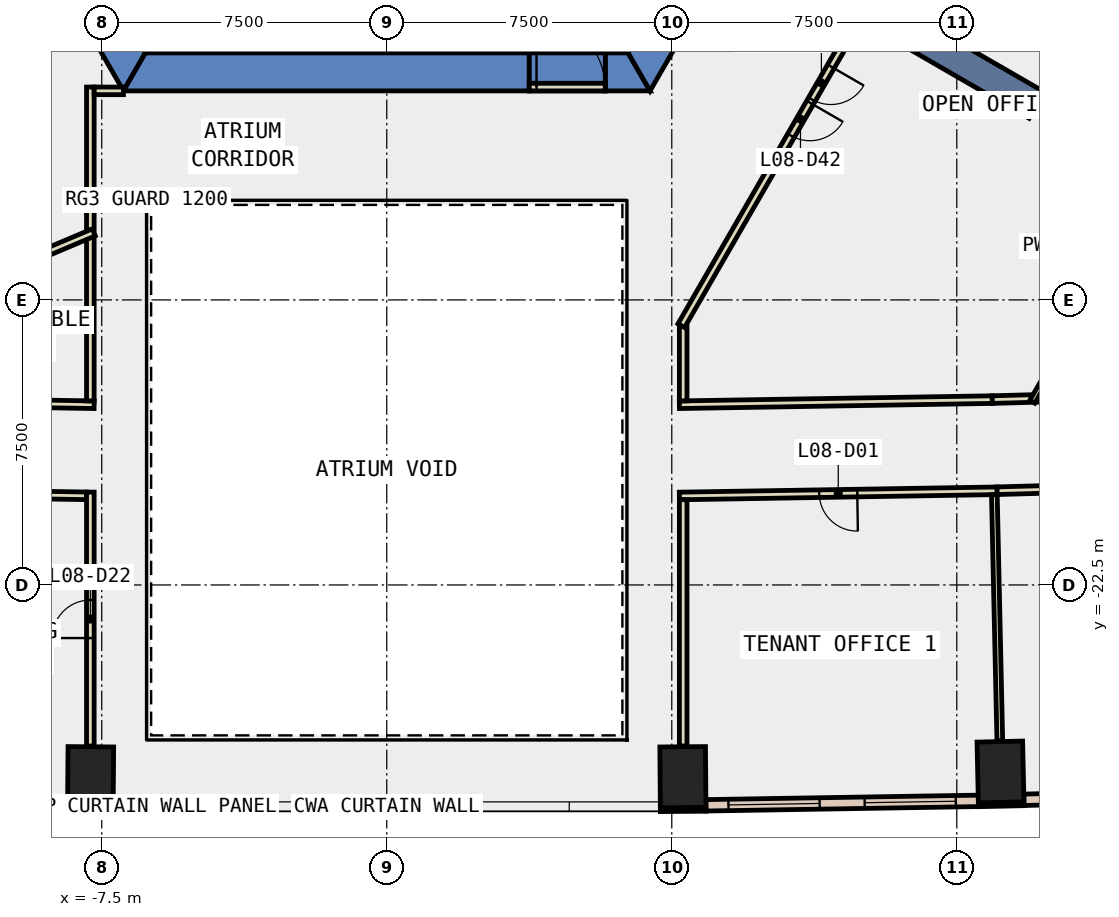
"""IFC4 building model, lengths in metres.
Left out: names, types, materials, properties, quantities, classifications, styles, units other than length and angle.
Written with IfcOpenShell. Run it as: python <this file> out.ifc"""

import sys

from ifc_helpers import new_model, si_unit, direction, frame, frame_2d, origin, origin_2d, place, context, subcontext, project, spatial, polyline, rectangle, outline, extrude, element, fill, save


model = new_model("IFC4")
c1 = context("Model", 3, precision=1e-05, world=origin(), true_north=direction((0.0, 1.0)))
c2 = subcontext(c1, "Body", "Model", "MODEL_VIEW")
j1 = project(units=[si_unit("LENGTHUNIT", "METRE"), si_unit("PLANEANGLEUNIT", "RADIAN")], contexts=[c1])
p1 = place(None, origin())
s1 = spatial("IfcSite", under=j1, at=p1, CompositionType="ELEMENT")
p2 = place(p1, origin())
s2 = spatial("IfcBuilding", under=s1, at=p2, CompositionType="ELEMENT")
p3 = place(p2, frame((0.0, 0.0, 43.4)))
s3 = spatial("IfcBuildingStorey", under=s2, at=p3, CompositionType="ELEMENT", Elevation=43.4)
for number, where, z_axis, x_axis in (
    (1, (-7.793, -27.558, -0.4), (0.0, 0.0, 1.0), (-1.0, 0.008, 0.0)),
    (2, (7.793, -27.558, -0.4), (0.0, 0.0, 1.0), (1.0, 0.008, 0.0)),
    (3, (16.15, -27.421, -0.4), (0.0, 0.0, 1.0), (1.0, 0.022, 0.0)),
):
    element("IfcColumn", number, at=place(p3, frame(where, z_axis=z_axis, x_axis=x_axis)), inside=s3, PredefinedType="COLUMN", context=c2, shape_type="SweptSolid", body=[
        extrude(rectangle(XDim=1.2, YDim=1.6, at=origin_2d()), origin(), (0.0, 0.0, 1.0), 4.2),
    ])
p4 = place(p3, frame((0.0, 0.0, -0.4)))
e4 = element("IfcWall", 4, at=p4, inside=s3, PredefinedType="SHEAR", context=c2, shape_type="SweptSolid", body=[
    extrude(outline(polyline([(-13.856, 2.5), (-6.928, -9.5), (-6.351, -8.5), (-12.702, 2.5), (-13.856, 2.5)])), origin(), (0.0, 0.0, 1.0), 4.2),
])
p5 = place(p3, frame((0.0, 0.0, -0.4)))
e5 = element("IfcWall", 5, at=p5, inside=s3, PredefinedType="SHEAR", context=c2, shape_type="SweptSolid", body=[
    extrude(outline(polyline([(3.75, -9.5), (3.75, -8.5), (-6.351, -8.5), (-6.928, -9.5), (3.75, -9.5)])), origin(), (0.0, 0.0, 1.0), 4.2),
])
p6 = place(p3, frame((0.0, 0.0, -0.4)))
e6 = element("IfcWall", 6, at=p6, inside=s3, PredefinedType="SHEAR", context=c2, shape_type="SweptSolid", body=[
    extrude(outline(polyline([(5.75, -8.5), (5.75, -9.5), (6.928, -9.5), (6.351, -8.5), (5.75, -8.5)])), origin(), (0.0, 0.0, 1.0), 4.2),
])
p7 = place(p3, frame((0.0, 0.0, 3.6)))
e7 = element("IfcWall", 7, at=p7, inside=s3, PredefinedType="SHEAR", context=c2, shape_type="SweptSolid", body=[
    extrude(outline(polyline([(5.75, -9.5), (5.75, -8.5), (3.75, -8.5), (3.75, -9.5), (5.75, -9.5)])), origin(), (0.0, 0.0, 1.0), 0.2),
])
p8 = place(p3, frame((0.0, 0.0, -0.4)))
e8 = element("IfcWall", 8, at=p8, inside=s3, PredefinedType="SHEAR", context=c2, shape_type="SweptSolid", body=[
    extrude(outline(polyline([(8.117, -7.44), (7.252, -6.94), (6.351, -8.5), (6.928, -9.5), (8.117, -7.44)])), origin(), (0.0, 0.0, 1.0), 4.2),
])
p9 = place(p3, frame((9.31, -5.375, -0.4), z_axis=(0.0, 0.0, 1.0), x_axis=(0.866017533419, -0.500013631625, 0.0)))
e9 = element("IfcWall", 9, at=p9, inside=s3, PredefinedType="SHEAR", context=c2, shape_type="SweptSolid", body=[
    extrude(rectangle(XDim=9.0, YDim=0.8, at=frame_2d((4.5, 0.0))), origin(), (0.0, 0.0, 1.0), 4.2),
])
for number, where, z_axis, x_axis in (
    (10, (-8.4, -28.403, 0.0), (0.0, 0.0, 1.0), (1.0, -0.008, 0.0)),
    (11, (7.2, -28.413, 0.0), (0.0, 0.0, 1.0), (1.0, 0.008, 0.0)),
):
    element("IfcWall", number, at=place(p3, frame(where, z_axis=z_axis, x_axis=x_axis)), inside=s3, PredefinedType="STANDARD", context=c2, shape_type="SweptSolid", body=[
        extrude(rectangle(XDim=1.2, YDim=0.1, at=frame_2d((0.6, 0.0))), origin(), (0.0, 0.0, 1.0), 3.8),
    ])
p10 = place(p3, frame((15.569, -28.284, 0.0), z_axis=(0.0, 0.0, 1.0), x_axis=(0.99976752127, 0.021561618973, 0.0)))
e12 = element("IfcWall", 12, at=p10, inside=s3, PredefinedType="STANDARD", context=c2, shape_type="SweptSolid", body=[
    extrude(rectangle(XDim=1.2, YDim=0.1, at=frame_2d((0.6, 0.0))), origin(), (0.0, 0.0, 1.0), 3.8),
])
p11 = place(p3, frame((-15.568, -28.181, 0.0), z_axis=(0.0, 0.0, 1.0), x_axis=(0.999866467443, -0.016341581408, 0.0)))
e13 = element("IfcWall", 13, at=p11, inside=s3, PredefinedType="STANDARD", context=c2, shape_type="SweptSolid", body=[
    extrude(rectangle(XDim=7.171, YDim=0.3, at=frame_2d((3.585, 0.0))), origin(), (0.0, 0.0, 1.0), 3.8),
])
p12 = place(p11, frame((0.593, 0.0, 0.9)))
e14 = element("IfcOpeningElement", 14, at=p12, cuts=e13, PredefinedType="OPENING", context=c2, shape_type="SweptSolid", body=[
    extrude(rectangle(XDim=2.4, YDim=2.6, at=frame_2d((1.2, 1.3))), frame((0.0, 0.16, 0.0), z_axis=(0.0, -1.0, 0.0), x_axis=(1.0, 0.0, 0.0)), (0.0, 0.0, 1.0), 0.32),
])
p13 = place(p11, frame((4.178, 0.0, 0.9)))
e15 = element("IfcOpeningElement", 15, at=p13, cuts=e13, PredefinedType="OPENING", context=c2, shape_type="SweptSolid", body=[
    extrude(rectangle(XDim=2.4, YDim=2.6, at=frame_2d((1.2, 1.3))), frame((0.0, 0.16, 0.0), z_axis=(0.0, -1.0, 0.0), x_axis=(1.0, 0.0, 0.0)), (0.0, 0.0, 1.0), 0.32),
])
p14 = place(p3, frame((8.398, -28.298, 0.0), z_axis=(0.0, 0.0, 1.0), x_axis=(0.999866467443, 0.016341581408, 0.0)))
e16 = element("IfcWall", 16, at=p14, inside=s3, PredefinedType="STANDARD", context=c2, shape_type="SweptSolid", body=[
    extrude(rectangle(XDim=7.171, YDim=0.3, at=frame_2d((3.585, 0.0))), origin(), (0.0, 0.0, 1.0), 3.8),
])
p15 = place(p14, frame((0.593, 0.0, 0.9)))
e17 = element("IfcOpeningElement", 17, at=p15, cuts=e16, PredefinedType="OPENING", context=c2, shape_type="SweptSolid", body=[
    extrude(rectangle(XDim=2.4, YDim=2.6, at=frame_2d((1.2, 1.3))), frame((0.0, 0.16, 0.0), z_axis=(0.0, -1.0, 0.0), x_axis=(1.0, 0.0, 0.0)), (0.0, 0.0, 1.0), 0.32),
])
p16 = place(p14, frame((4.178, 0.0, 0.9)))
e18 = element("IfcOpeningElement", 18, at=p16, cuts=e16, PredefinedType="OPENING", context=c2, shape_type="SweptSolid", body=[
    extrude(rectangle(XDim=2.4, YDim=2.6, at=frame_2d((1.2, 1.3))), frame((0.0, 0.16, 0.0), z_axis=(0.0, -1.0, 0.0), x_axis=(1.0, 0.0, 0.0)), (0.0, 0.0, 1.0), 0.32),
])
p17 = place(p3, frame((16.765, -28.154, 0.0), z_axis=(0.0, 0.0, 1.0), x_axis=(0.999611502654, 0.02787191709, 0.0)))
e19 = element("IfcWall", 19, at=p17, inside=s3, PredefinedType="STANDARD", context=c2, shape_type="SweptSolid", body=[
    extrude(rectangle(XDim=7.174, YDim=0.3, at=frame_2d((3.587, 0.0))), origin(), (0.0, 0.0, 1.0), 3.8),
])
p18 = place(p17, frame((0.593, 0.0, 0.9)))
e20 = element("IfcOpeningElement", 20, at=p18, cuts=e19, PredefinedType="OPENING", context=c2, shape_type="SweptSolid", body=[
    extrude(rectangle(XDim=2.4, YDim=2.6, at=frame_2d((1.2, 1.3))), frame((0.0, 0.16, 0.0), z_axis=(0.0, -1.0, 0.0), x_axis=(1.0, 0.0, 0.0)), (0.0, 0.0, 1.0), 0.32),
])
p19 = place(p17, frame((4.18, 0.0, 0.9)))
e21 = element("IfcOpeningElement", 21, at=p19, cuts=e19, PredefinedType="OPENING", context=c2, shape_type="SweptSolid", body=[
    extrude(rectangle(XDim=2.4, YDim=2.6, at=frame_2d((1.2, 1.3))), frame((0.0, 0.16, 0.0), z_axis=(0.0, -1.0, 0.0), x_axis=(1.0, 0.0, 0.0)), (0.0, 0.0, 1.0), 0.32),
])
p20 = place(p3, frame((7.7, -17.758, 0.0), z_axis=(0.0, 0.0, 1.0), x_axis=(0.999865574926, 0.016396099485, 0.0)))
e22 = element("IfcWall", 22, at=p20, inside=s3, PredefinedType="PARTITIONING", context=c2, shape_type="SweptSolid", body=[
    extrude(rectangle(XDim=8.234, YDim=0.2, at=frame_2d((4.117, 0.0))), origin(), (0.0, 0.0, 1.0), 3.8),
])
p21 = place(p3, frame((15.933, -17.623, 0.0), z_axis=(0.0, 0.0, 1.0), x_axis=(0.999627129061, 0.027305729179, 0.0)))
e23 = element("IfcWall", 23, at=p21, inside=s3, PredefinedType="PARTITIONING", context=c2, shape_type="SweptSolid", body=[
    extrude(rectangle(XDim=1.028, YDim=0.2, at=frame_2d((0.514, 0.0))), origin(), (0.0, 0.0, 1.0), 3.8),
])
p22 = place(p3, frame((17.111, -17.591, 0.0), z_axis=(0.0, 0.0, 1.0), x_axis=(0.99960470841, 0.028114532261, 0.0)))
e24 = element("IfcWall", 24, at=p22, inside=s3, PredefinedType="PARTITIONING", context=c2, shape_type="SweptSolid", body=[
    extrude(rectangle(XDim=5.87, YDim=0.2, at=frame_2d((2.935, 0.0))), origin(), (0.0, 0.0, 1.0), 3.8),
])
p23 = place(p22, frame((2.435, 0.0, 0.0)))
e25 = element("IfcOpeningElement", 25, at=p23, cuts=e24, PredefinedType="OPENING", context=c2, shape_type="SweptSolid", body=[
    extrude(rectangle(XDim=1.0, YDim=2.1, at=frame_2d((0.5, 1.05))), frame((0.0, 0.11, 0.0), z_axis=(0.0, -1.0, 0.0), x_axis=(1.0, 0.0, 0.0)), (0.0, 0.0, 1.0), 0.22),
])
p24 = place(p3, frame((-15.73, -17.627, 0.0), z_axis=(0.0, 0.0, 1.0), x_axis=(0.999866746812, -0.016324479129, 0.0)))
e26 = element("IfcWall", 26, at=p24, inside=s3, PredefinedType="PARTITIONING", context=c2, shape_type="SweptSolid", body=[
    extrude(rectangle(XDim=8.031, YDim=0.2, at=frame_2d((4.016, 0.0))), origin(), (0.0, 0.0, 1.0), 3.8),
])
p25 = place(p24, frame((3.515, 0.0, 0.0)))
e27 = element("IfcOpeningElement", 27, at=p25, cuts=e26, PredefinedType="OPENING", context=c2, shape_type="SweptSolid", body=[
    extrude(rectangle(XDim=1.0, YDim=2.1, at=frame_2d((0.5, 1.05))), frame((0.0, 0.11, 0.0), z_axis=(0.0, -1.0, 0.0), x_axis=(1.0, 0.0, 0.0)), (0.0, 0.0, 1.0), 0.22),
])
p26 = place(p3, frame((16.061, -20.022, 0.0), z_axis=(0.0, 0.0, 1.0), x_axis=(-0.999865858466, -0.016378799504, 0.0)))
e28 = element("IfcWall", 28, at=p26, inside=s3, PredefinedType="PARTITIONING", context=c2, shape_type="SweptSolid", body=[
    extrude(rectangle(XDim=8.362, YDim=0.2, at=frame_2d((4.181, 0.0))), origin(), (0.0, 0.0, 1.0), 3.8),
])
p27 = place(p26, frame((3.681, 0.0, 0.0)))
e29 = element("IfcOpeningElement", 29, at=p27, cuts=e28, PredefinedType="OPENING", context=c2, shape_type="SweptSolid", body=[
    extrude(rectangle(XDim=1.0, YDim=2.1, at=frame_2d((0.5, 1.05))), frame((0.0, 0.11, 0.0), z_axis=(0.0, -1.0, 0.0), x_axis=(1.0, 0.0, 0.0)), (0.0, 0.0, 1.0), 0.22),
])
p28 = place(p3, frame((24.261, -19.792, 0.0), z_axis=(0.0, 0.0, 1.0), x_axis=(-0.999610256124, -0.027916587377, 0.0)))
e30 = element("IfcWall", 30, at=p28, inside=s3, PredefinedType="PARTITIONING", context=c2, shape_type="SweptSolid", body=[
    extrude(rectangle(XDim=8.203, YDim=0.2, at=frame_2d((4.102, 0.0))), origin(), (0.0, 0.0, 1.0), 3.8),
])
p29 = place(p28, frame((3.677, 0.0, 0.0)))
e31 = element("IfcOpeningElement", 31, at=p29, cuts=e30, PredefinedType="OPENING", context=c2, shape_type="SweptSolid", body=[
    extrude(rectangle(XDim=1.0, YDim=2.1, at=frame_2d((0.5, 1.05))), frame((0.0, 0.11, 0.0), z_axis=(0.0, -1.0, 0.0), x_axis=(1.0, 0.0, 0.0)), (0.0, 0.0, 1.0), 0.22),
])
p30 = place(p3, frame((-7.9, -20.155, 0.0), z_axis=(0.0, 0.0, 1.0), x_axis=(-0.999867846419, 0.016256989184, 0.0)))
e32 = element("IfcWall", 32, at=p30, inside=s3, PredefinedType="PARTITIONING", context=c2, shape_type="SweptSolid", body=[
    extrude(rectangle(XDim=3.875, YDim=0.2, at=frame_2d((1.937, 0.0))), origin(), (0.0, 0.0, 1.0), 3.8),
])
p31 = place(p3, frame((7.8, -15.69, 0.0), z_axis=(0.0, 0.0, 1.0), x_axis=(0.0, -1.0, 0.0)))
e33 = element("IfcWall", 33, at=p31, inside=s3, PredefinedType="PARTITIONING", context=c2, shape_type="SweptSolid", body=[
    extrude(rectangle(XDim=1.967, YDim=0.2, at=frame_2d((0.983, 0.0))), origin(), (0.0, 0.0, 1.0), 3.8),
])
p32 = place(p3, frame((-7.8, -13.161, 0.0), z_axis=(0.0, 0.0, 1.0), x_axis=(0.0, 1.0, 0.0)))
e34 = element("IfcWall", 34, at=p32, inside=s3, PredefinedType="PARTITIONING", context=c2, shape_type="SweptSolid", body=[
    extrude(rectangle(XDim=3.762, YDim=0.2, at=frame_2d((1.881, 0.0))), origin(), (0.0, 0.0, 1.0), 3.8),
])
p33 = place(p3, frame((-7.7, -9.499, 0.0), z_axis=(0.0, 0.0, 1.0), x_axis=(1.0, 0.0, 0.0)))
e35 = element("IfcWall", 35, at=p33, inside=s3, PredefinedType="PARTITIONING", context=c2, shape_type="SweptSolid", body=[
    extrude(rectangle(XDim=0.771, YDim=0.2, at=frame_2d((0.385, 0.0))), origin(), (0.0, 0.0, 1.0), 3.8),
])
p34 = place(p3, frame((-7.8, -17.657, 0.0), z_axis=(0.0, 0.0, 1.0), x_axis=(0.0, 1.0, 0.0)))
e36 = element("IfcWall", 36, at=p34, inside=s3, PredefinedType="PARTITIONING", context=c2, shape_type="SweptSolid", body=[
    extrude(rectangle(XDim=4.296, YDim=0.2, at=frame_2d((2.148, 0.0))), origin(), (0.0, 0.0, 1.0), 3.8),
])
p35 = place(p3, frame((7.8, -20.257, 0.0), z_axis=(0.0, 0.0, 1.0), x_axis=(0.0, -1.0, 0.0)))
e37 = element("IfcWall", 37, at=p35, inside=s3, PredefinedType="PARTITIONING", context=c2, shape_type="SweptSolid", body=[
    extrude(rectangle(XDim=6.481, YDim=0.2, at=frame_2d((3.24, 0.0))), origin(), (0.0, 0.0, 1.0), 3.8),
])
p36 = place(p3, frame((-7.8, -26.738, 0.0), z_axis=(0.0, 0.0, 1.0), x_axis=(0.0, 1.0, 0.0)))
e38 = element("IfcWall", 38, at=p36, inside=s3, PredefinedType="PARTITIONING", context=c2, shape_type="SweptSolid", body=[
    extrude(rectangle(XDim=6.681, YDim=0.2, at=frame_2d((3.341, 0.0))), origin(), (0.0, 0.0, 1.0), 3.8),
])
p37 = place(p36, frame((2.841, 0.0, 0.0)))
e39 = element("IfcOpeningElement", 39, at=p37, cuts=e38, PredefinedType="OPENING", context=c2, shape_type="SweptSolid", body=[
    extrude(rectangle(XDim=1.0, YDim=2.1, at=frame_2d((0.5, 1.05))), frame((0.0, 0.11, 0.0), z_axis=(0.0, -1.0, 0.0), x_axis=(1.0, 0.0, 0.0)), (0.0, 0.0, 1.0), 0.22),
])
p38 = place(p3, frame((20.445, -11.688, 0.0), z_axis=(0.0, 0.0, 1.0), x_axis=(-0.500010633597, -0.866019264387, 0.0)))
e40 = element("IfcWall", 40, at=p38, inside=s3, PredefinedType="PARTITIONING", context=c2, shape_type="SweptSolid", body=[
    extrude(rectangle(XDim=6.918, YDim=0.15, at=frame_2d((3.459, 0.0))), origin(), (0.0, 0.0, 1.0), 3.8),
])
p39 = place(p3, frame((-7.708, -13.222, 0.0), z_axis=(0.0, 0.0, 1.0), x_axis=(-0.921093468555, -0.389341523839, 0.0)))
e41 = element("IfcWall", 41, at=p39, inside=s3, PredefinedType="PARTITIONING", context=c2, shape_type="SweptSolid", body=[
    extrude(rectangle(XDim=9.233, YDim=0.2, at=frame_2d((4.617, 0.0))), origin(), (0.0, 0.0, 1.0), 3.8),
])
p40 = place(p3, frame((15.988, -20.123, 0.0), z_axis=(0.0, 0.0, 1.0), x_axis=(0.022230127358, -0.999752880185, 0.0)))
e42 = element("IfcWall", 42, at=p40, inside=s3, PredefinedType="PARTITIONING", context=c2, shape_type="SweptSolid", body=[
    extrude(rectangle(XDim=6.48, YDim=0.15, at=frame_2d((3.24, 0.0))), origin(), (0.0, 0.0, 1.0), 3.8),
])
p41 = place(p3, frame((3.75, -9.4, 0.0), z_axis=(0.0, 0.0, 1.0), x_axis=(1.0, 0.0, 0.0)))
e43 = element("IfcWall", 43, at=p41, inside=s3, PredefinedType="PARTITIONING", context=c2, shape_type="SweptSolid", body=[
    extrude(rectangle(XDim=2.0, YDim=0.2, at=frame_2d((1.0, 0.0))), origin(), (0.0, 0.0, 1.0), 2.4),
])
p42 = place(p41, frame((0.19, 0.0, 0.0)))
e44 = element("IfcOpeningElement", 44, at=p42, cuts=e43, PredefinedType="OPENING", context=c2, shape_type="SweptSolid", body=[
    extrude(rectangle(XDim=1.8, YDim=2.1, at=frame_2d((0.9, 1.05))), frame((0.0, 0.11, 0.0), z_axis=(0.0, -1.0, 0.0), x_axis=(1.0, 0.0, 0.0)), (0.0, 0.0, 1.0), 0.22),
])
p43 = place(p3, frame((12.401, -7.621, 0.0), z_axis=(0.0, 0.0, 1.0), x_axis=(-0.499983724212, -0.866034800411, 0.0)))
e45 = element("IfcWall", 45, at=p43, inside=s3, PredefinedType="PARTITIONING", context=c2, shape_type="SweptSolid", body=[
    extrude(rectangle(XDim=9.302, YDim=0.2, at=frame_2d((4.651, 0.0))), origin(), (0.0, 0.0, 1.0), 3.8),
])
p44 = place(p43, frame((1.429, 0.0, 0.0)))
e46 = element("IfcOpeningElement", 46, at=p44, cuts=e45, PredefinedType="OPENING", context=c2, shape_type="SweptSolid", body=[
    extrude(rectangle(XDim=1.0, YDim=2.1, at=frame_2d((0.5, 1.05))), frame((0.0, 0.11, 0.0), z_axis=(0.0, -1.0, 0.0), x_axis=(1.0, 0.0, 0.0)), (0.0, 0.0, 1.0), 0.22),
])
p45 = place(p43, frame((2.529, 0.0, 0.0)))
e47 = element("IfcOpeningElement", 47, at=p45, cuts=e45, PredefinedType="OPENING", context=c2, shape_type="SweptSolid", body=[
    extrude(rectangle(XDim=1.0, YDim=2.1, at=frame_2d((0.5, 1.05))), frame((0.0, 0.11, 0.0), z_axis=(0.0, -1.0, 0.0), x_axis=(1.0, 0.0, 0.0)), (0.0, 0.0, 1.0), 0.22),
])
p46 = place(p15, origin())
e48 = element("IfcWindow", 48, at=p46, inside=s3, PartitioningType="SINGLE_PANEL", PredefinedType="WINDOW", context=c2, shape_type="SweptSolid", body=[
    extrude(rectangle(XDim=2.4, YDim=2.6, at=frame_2d((1.2, 1.3))), frame((0.0, 0.03, 0.0), z_axis=(0.0, -1.0, 0.0), x_axis=(1.0, 0.0, 0.0)), (0.0, 0.0, 1.0), 0.06),
])
fill(e17, e48)
p47 = place(p16, origin())
e49 = element("IfcWindow", 49, at=p47, inside=s3, PartitioningType="SINGLE_PANEL", PredefinedType="WINDOW", context=c2, shape_type="SweptSolid", body=[
    extrude(rectangle(XDim=2.4, YDim=2.6, at=frame_2d((1.2, 1.3))), frame((0.0, 0.03, 0.0), z_axis=(0.0, -1.0, 0.0), x_axis=(1.0, 0.0, 0.0)), (0.0, 0.0, 1.0), 0.06),
])
fill(e18, e49)
p48 = place(p27, origin())
e50 = element("IfcDoor", 50, at=p48, inside=s3, OperationType="SINGLE_SWING_RIGHT", PredefinedType="DOOR", context=c2, shape_type="SweptSolid", body=[
    extrude(rectangle(XDim=1.0, YDim=2.1, at=frame_2d((0.5, 1.05))), frame((0.0, 0.025, 0.0), z_axis=(0.0, -1.0, 0.0), x_axis=(1.0, 0.0, 0.0)), (0.0, 0.0, 1.0), 0.05),
])
fill(e29, e50)
p49 = place(p37, origin())
e51 = element("IfcDoor", 51, at=p49, inside=s3, OperationType="SINGLE_SWING_LEFT", PredefinedType="DOOR", context=c2, shape_type="SweptSolid", body=[
    extrude(rectangle(XDim=1.0, YDim=2.1, at=frame_2d((0.5, 1.05))), frame((0.0, 0.025, 0.0), z_axis=(0.0, -1.0, 0.0), x_axis=(1.0, 0.0, 0.0)), (0.0, 0.0, 1.0), 0.05),
])
fill(e39, e51)
p50 = place(p44, origin())
e52 = element("IfcDoor", 52, at=p50, inside=s3, OperationType="SINGLE_SWING_LEFT", PredefinedType="DOOR", context=c2, shape_type="SweptSolid", body=[
    extrude(rectangle(XDim=1.0, YDim=2.1, at=frame_2d((0.5, 1.05))), frame((0.0, 0.025, 0.0), z_axis=(0.0, -1.0, 0.0), x_axis=(1.0, 0.0, 0.0)), (0.0, 0.0, 1.0), 0.05),
])
fill(e46, e52)
p51 = place(p45, origin())
e53 = element("IfcDoor", 53, at=p51, inside=s3, OperationType="SINGLE_SWING_RIGHT", PredefinedType="DOOR", context=c2, shape_type="SweptSolid", body=[
    extrude(rectangle(XDim=1.0, YDim=2.1, at=frame_2d((0.5, 1.05))), frame((0.0, 0.025, 0.0), z_axis=(0.0, -1.0, 0.0), x_axis=(1.0, 0.0, 0.0)), (0.0, 0.0, 1.0), 0.05),
])
fill(e47, e53)
p52 = place(p42, origin())
e54 = element("IfcDoor", 54, at=p52, inside=s3, OperationType="DOUBLE_DOOR_SINGLE_SWING", PredefinedType="DOOR", context=c2, shape_type="SweptSolid", body=[
    extrude(rectangle(XDim=1.8, YDim=2.1, at=frame_2d((0.9, 1.05))), frame((0.0, 0.025, 0.0), z_axis=(0.0, -1.0, 0.0), x_axis=(1.0, 0.0, 0.0)), (0.0, 0.0, 1.0), 0.05),
])
fill(e44, e54)
save(model, sys.argv[1])
